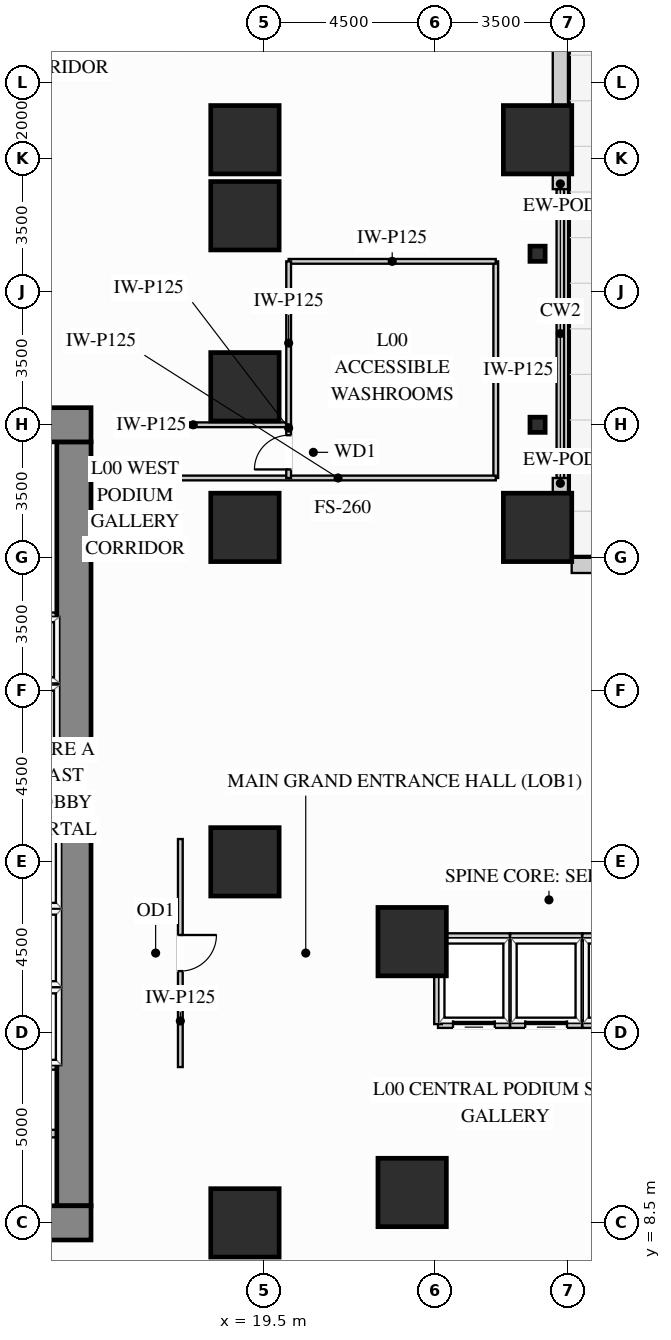
"""IFC4 building model, lengths in metres.
Left out: names, types, materials, properties, quantities, classifications, styles, units other than length and angle.
Written with IfcOpenShell. Run it as: python <this file> out.ifc"""

import sys

from ifc_helpers import new_model, si_unit, direction, frame, frame_2d, origin, origin_2d, place, context, subcontext, project, spatial, rectangle, hollow_rectangle, extrude, source, transform, mapped, element, fill, save


model = new_model("IFC4")
c1 = context("Model", 3, precision=1e-05, world=origin(), true_north=direction((0.0, 1.0)))
c2 = subcontext(c1, "Body", "Model", "MODEL_VIEW")
j1 = project(units=[si_unit("LENGTHUNIT", "METRE"), si_unit("PLANEANGLEUNIT", "RADIAN")], contexts=[c1])
p1 = place(None, origin())
s1 = spatial("IfcSite", under=j1, at=p1, CompositionType="ELEMENT")
p2 = place(p1, origin())
s2 = spatial("IfcBuilding", under=s1, at=p2, CompositionType="ELEMENT")
p3 = place(p2, origin())
s3 = spatial("IfcBuildingStorey", under=s2, at=p3, CompositionType="ELEMENT", Elevation=0.0)
m1 = source(origin(), c2, "Body", "SweptSolid", [
    extrude(rectangle(XDim=1.8, YDim=1.8, at=origin_2d()), origin(), (0.0, 0.0, 1.0), 4.25),
])
for number, where, z_axis, x_axis in (
    (1, (26.7, 26.8, 0.0), (0.0, 0.0, 1.0), (1.0, 0.0, 0.0)),
    (2, (26.7, 37.0, 0.0), (0.0, 0.0, 1.0), (1.0, 0.0, 0.0)),
    (3, (19.0, 8.5, 0.0), (0.0, 0.0, 1.0), (1.0, 0.0, 0.0)),
    (4, (19.0, 18.0, 0.0), (0.0, 0.0, 1.0), (1.0, 0.0, 0.0)),
    (5, (19.0, 26.8, 0.0), (0.0, 0.0, 1.0), (1.0, 0.0, 0.0)),
    (6, (19.0, 30.5, 0.0), (0.0, 0.0, 1.0), (1.0, 0.0, 0.0)),
    (7, (19.0, 35.0, 0.0), (0.0, 0.0, 1.0), (1.0, 0.0, 0.0)),
    (8, (19.0, 37.0, 0.0), (0.0, 0.0, 1.0), (1.0, 0.0, 0.0)),
    (9, (23.4, 9.3, 0.0), (0.0, 0.0, 1.0), (1.0, 0.0, 0.0)),
    (10, (23.4, 15.9, 0.0), (0.0, 0.0, 1.0), (1.0, 0.0, 0.0)),
):
    element("IfcColumn", number, at=place(p3, frame(where, z_axis=z_axis, x_axis=x_axis)), inside=s3, PredefinedType="COLUMN", context=c2, shape_type="MappedRepresentation", body=[
        mapped(m1, transform((0.0, 0.0, 0.0), x_axis=(1.0, 0.0, 0.0), y_axis=(0.0, 1.0, 0.0), z_axis=(0.0, 0.0, 1.0))),
    ])
m2 = source(origin(), c2, "Body", "SweptSolid", [
    extrude(hollow_rectangle(XDim=0.4, YDim=0.4, WallThickness=0.02, at=origin_2d()), origin(), (0.0, 0.0, 1.0), 4.25),
])
for number, where, z_axis, x_axis in (
    (11, (26.7, 29.5, 0.0), (0.0, 0.0, 1.0), (1.0, 0.0, 0.0)),
    (12, (26.7, 34.0, 0.0), (0.0, 0.0, 1.0), (1.0, 0.0, 0.0)),
):
    element("IfcColumn", number, at=place(p3, frame(where, z_axis=z_axis, x_axis=x_axis)), inside=s3, PredefinedType="PILASTER", context=c2, shape_type="MappedRepresentation", body=[
        mapped(m2, transform((0.0, 0.0, 0.0), x_axis=(1.0, 0.0, 0.0), y_axis=(0.0, 1.0, 0.0), z_axis=(0.0, 0.0, 1.0))),
    ])
m3 = source(origin(), c2, "Body", "SweptSolid", [
    extrude(rectangle(XDim=9.87, YDim=0.9, at=frame_2d((4.935, 0.0))), origin(), (0.0, 0.0, 1.0), 4.25),
])
p4 = place(p3, frame((14.5, 8.95, 0.0), z_axis=(0.0, 0.0, 1.0), x_axis=(0.0, 1.0, 0.0)))
e13 = element("IfcWall", 13, at=p4, inside=s3, PredefinedType="SHEAR", context=c2, shape_type="MappedRepresentation", body=[
    mapped(m3, transform((0.0, 0.0, 0.0), x_axis=(1.0, 0.0, 0.0), y_axis=(0.0, 1.0, 0.0), z_axis=(0.0, 0.0, 1.0))),
])
m4 = source(origin(), c2, "Body", "SweptSolid", [
    extrude(rectangle(XDim=8.17, YDim=0.9, at=frame_2d((4.085, 0.0))), origin(), (0.0, 0.0, 1.0), 4.25),
])
p5 = place(p3, frame((14.5, 20.88, 0.0), z_axis=(0.0, 0.0, 1.0), x_axis=(0.0, 1.0, 0.0)))
e14 = element("IfcWall", 14, at=p5, inside=s3, PredefinedType="SHEAR", context=c2, shape_type="MappedRepresentation", body=[
    mapped(m4, transform((0.0, 0.0, 0.0), x_axis=(1.0, 0.0, 0.0), y_axis=(0.0, 1.0, 0.0), z_axis=(0.0, 0.0, 1.0))),
])
m5 = source(origin(), c2, "Body", "SweptSolid", [
    extrude(rectangle(XDim=10.9, YDim=0.9, at=frame_2d((5.45, 0.0))), origin(), (0.0, 0.0, 1.0), 4.25),
])
for number, where, z_axis, x_axis in (
    (15, (4.05, 29.5, 0.0), (0.0, 0.0, 1.0), (1.0, 0.0, 0.0)),
    (16, (4.05, 8.5, 0.0), (0.0, 0.0, 1.0), (1.0, 0.0, 0.0)),
):
    element("IfcWall", number, at=place(p3, frame(where, z_axis=z_axis, x_axis=x_axis)), inside=s3, PredefinedType="SHEAR", context=c2, shape_type="MappedRepresentation", body=[
        mapped(m5, transform((0.0, 0.0, 0.0), x_axis=(1.0, 0.0, 0.0), y_axis=(0.0, 1.0, 0.0), z_axis=(0.0, 0.0, 1.0))),
    ])
p6 = place(p3, frame((46.702, 25.8, 0.0), z_axis=(0.0, 0.0, 1.0), x_axis=(-1.0, 0.0, 0.0)))
e17 = element("IfcWall", 17, at=p6, inside=s3, PredefinedType="SOLIDWALL", context=c2, shape_type="SweptSolid", body=[
    extrude(rectangle(XDim=19.104, YDim=0.4, at=frame_2d((9.552, 0.0))), origin(), (0.0, 0.0, 1.0), 4.235),
])
p7 = place(p6, frame((8.202, 0.0, 0.65)))
e18 = element("IfcOpeningElement", 18, at=p7, cuts=e17, PredefinedType="OPENING", context=c2, shape_type="SweptSolid", body=[
    extrude(rectangle(XDim=2.7, YDim=2.6, at=frame_2d((1.35, 1.3))), frame((0.0, 0.21, 0.0), z_axis=(0.0, -1.0, 0.0), x_axis=(1.0, 0.0, 0.0)), (0.0, 0.0, 1.0), 0.42),
])
m6 = source(origin(), c2, "Body", "SweptSolid", [
    extrude(rectangle(XDim=0.402, YDim=0.4, at=frame_2d((0.201, 0.0))), origin(), (0.0, 0.0, 1.0), 4.235),
])
for number, where, z_axis, x_axis in (
    (19, (27.3, 27.698, 0.0), (0.0, 0.0, 1.0), (0.0, 1.0, 0.0)),
    (20, (27.3, 35.7, 0.0), (0.0, 0.0, 1.0), (0.0, 1.0, 0.0)),
):
    element("IfcWall", number, at=place(p3, frame(where, z_axis=z_axis, x_axis=x_axis)), inside=s3, PredefinedType="SOLIDWALL", context=c2, shape_type="MappedRepresentation", body=[
        mapped(m6, transform((0.0, 0.0, 0.0), x_axis=(1.0, 0.0, 0.0), y_axis=(0.0, 1.0, 0.0), z_axis=(0.0, 0.0, 1.0))),
    ])
p8 = place(p3, frame((27.3, 37.898, 0.0), z_axis=(0.0, 0.0, 1.0), x_axis=(0.0, 1.0, 0.0)))
e21 = element("IfcWall", 21, at=p8, inside=s3, PredefinedType="SOLIDWALL", context=c2, shape_type="SweptSolid", body=[
    extrude(rectangle(XDim=10.604, YDim=0.4, at=frame_2d((5.302, 0.0))), origin(), (0.0, 0.0, 1.0), 4.235),
])
p9 = place(p8, frame((1.652, 0.0, 0.0)))
e22 = element("IfcOpeningElement", 22, at=p9, cuts=e21, PredefinedType="OPENING", context=c2, shape_type="SweptSolid", body=[
    extrude(rectangle(XDim=2.4, YDim=2.6, at=frame_2d((1.2, 1.3))), frame((0.0, 0.21, 0.0), z_axis=(0.0, -1.0, 0.0), x_axis=(1.0, 0.0, 0.0)), (0.0, 0.0, 1.0), 0.42),
])
p10 = place(p8, frame((6.502, 0.0, 0.0)))
e23 = element("IfcOpeningElement", 23, at=p10, cuts=e21, PredefinedType="OPENING", context=c2, shape_type="SweptSolid", body=[
    extrude(rectangle(XDim=3.8, YDim=2.65, at=frame_2d((1.9, 1.325))), frame((0.0, 0.21, 0.0), z_axis=(0.0, -1.0, 0.0), x_axis=(1.0, 0.0, 0.0)), (0.0, 0.0, 1.0), 0.42),
])
m7 = source(origin(), c2, "Body", "SweptSolid", [
    extrude(rectangle(XDim=5.7, YDim=0.125, at=frame_2d((2.85, 0.0))), origin(), (0.0, 0.0, 1.0), 4.235),
])
p11 = place(p3, frame((25.6, 28.1, 0.0), z_axis=(0.0, 0.0, 1.0), x_axis=(0.0, 1.0, 0.0)))
e24 = element("IfcWall", 24, at=p11, inside=s3, PredefinedType="PARTITIONING", context=c2, shape_type="MappedRepresentation", body=[
    mapped(m7, transform((0.0, 0.0, 0.0), x_axis=(1.0, 0.0, 0.0), y_axis=(0.0, 1.0, 0.0), z_axis=(0.0, 0.0, 1.0))),
])
m8 = source(origin(), c2, "Body", "SweptSolid", [
    extrude(rectangle(XDim=2.85, YDim=0.125, at=frame_2d((1.425, 0.0))), origin(), (0.0, 0.0, 1.0), 4.235),
])
p12 = place(p3, frame((17.3, 29.5, 0.0), z_axis=(0.0, 0.0, 1.0), x_axis=(1.0, 0.0, 0.0)))
e25 = element("IfcWall", 25, at=p12, inside=s3, PredefinedType="PARTITIONING", context=c2, shape_type="MappedRepresentation", body=[
    mapped(m8, transform((0.0, 0.0, 0.0), x_axis=(1.0, 0.0, 0.0), y_axis=(0.0, 1.0, 0.0), z_axis=(0.0, 0.0, 1.0))),
])
m9 = source(origin(), c2, "Body", "SweptSolid", [
    extrude(rectangle(XDim=5.45, YDim=0.125, at=frame_2d((2.725, 0.0))), origin(), (0.0, 0.0, 1.0), 4.235),
])
p13 = place(p3, frame((20.15, 33.8, 0.0), z_axis=(0.0, 0.0, 1.0), x_axis=(1.0, 0.0, 0.0)))
e26 = element("IfcWall", 26, at=p13, inside=s3, PredefinedType="PARTITIONING", context=c2, shape_type="MappedRepresentation", body=[
    mapped(m9, transform((0.0, 0.0, 0.0), x_axis=(1.0, 0.0, 0.0), y_axis=(0.0, 1.0, 0.0), z_axis=(0.0, 0.0, 1.0))),
])
m10 = source(origin(), c2, "Body", "SweptSolid", [
    extrude(rectangle(XDim=8.3, YDim=0.125, at=frame_2d((4.15, 0.0))), origin(), (0.0, 0.0, 1.0), 4.235),
])
p14 = place(p3, frame((17.3, 28.1, 0.0), z_axis=(0.0, 0.0, 1.0), x_axis=(1.0, 0.0, 0.0)))
e27 = element("IfcWall", 27, at=p14, inside=s3, PredefinedType="PARTITIONING", context=c2, shape_type="MappedRepresentation", body=[
    mapped(m10, transform((0.0, 0.0, 0.0), x_axis=(1.0, 0.0, 0.0), y_axis=(0.0, 1.0, 0.0), z_axis=(0.0, 0.0, 1.0))),
])
m11 = source(origin(), c2, "Body", "SweptSolid", [
    extrude(rectangle(XDim=4.3, YDim=0.125, at=frame_2d((2.15, 0.0))), origin(), (0.0, 0.0, 1.0), 4.235),
])
p15 = place(p3, frame((20.15, 29.5, 0.0), z_axis=(0.0, 0.0, 1.0), x_axis=(0.0, 1.0, 0.0)))
e28 = element("IfcWall", 28, at=p15, inside=s3, PredefinedType="PARTITIONING", context=c2, shape_type="MappedRepresentation", body=[
    mapped(m11, transform((0.0, 0.0, 0.0), x_axis=(1.0, 0.0, 0.0), y_axis=(0.0, 1.0, 0.0), z_axis=(0.0, 0.0, 1.0))),
])
p16 = place(p3, frame((20.15, 28.1, 0.0), z_axis=(0.0, 0.0, 1.0), x_axis=(0.0, 1.0, 0.0)))
e29 = element("IfcWall", 29, at=p16, inside=s3, PredefinedType="PARTITIONING", context=c2, shape_type="SweptSolid", body=[
    extrude(rectangle(XDim=1.4, YDim=0.125, at=frame_2d((0.7, 0.0))), origin(), (0.0, 0.0, 1.0), 4.235),
])
p17 = place(p16, frame((0.225, 0.0, 0.0)))
e30 = element("IfcOpeningElement", 30, at=p17, cuts=e29, PredefinedType="OPENING", context=c2, shape_type="SweptSolid", body=[
    extrude(rectangle(XDim=0.9, YDim=2.15, at=frame_2d((0.45, 1.075))), frame((0.0, 0.073, 0.0), z_axis=(0.0, -1.0, 0.0), x_axis=(1.0, 0.0, 0.0)), (0.0, 0.0, 1.0), 0.145),
])
p18 = place(p3, frame((17.3, 12.6, 0.0), z_axis=(0.0, 0.0, 1.0), x_axis=(0.0, 1.0, 0.0)))
e31 = element("IfcWall", 31, at=p18, inside=s3, PredefinedType="PARTITIONING", context=c2, shape_type="SweptSolid", body=[
    extrude(rectangle(XDim=6.0, YDim=0.125, at=frame_2d((3.0, 0.0))), origin(), (0.0, 0.0, 1.0), 4.235),
])
p19 = place(p18, frame((2.525, 0.0, 0.0)))
e32 = element("IfcOpeningElement", 32, at=p19, cuts=e31, PredefinedType="OPENING", context=c2, shape_type="SweptSolid", body=[
    extrude(rectangle(XDim=0.95, YDim=2.15, at=frame_2d((0.475, 1.075))), frame((0.0, 0.073, 0.0), z_axis=(0.0, -1.0, 0.0), x_axis=(1.0, 0.0, 0.0)), (0.0, 0.0, 1.0), 0.145),
])
m12 = source(origin(), c2, "Body", "SweptSolid", [
    extrude(rectangle(XDim=1.6, YDim=0.2, at=frame_2d((0.8, 0.0))), origin(), (0.0, 0.0, 1.0), 4.235),
])
p20 = place(p3, frame((12.42, 10.85, 0.0), z_axis=(0.0, 0.0, 1.0), x_axis=(1.0, 0.0, 0.0)))
e33 = element("IfcWall", 33, at=p20, inside=s3, PredefinedType="PARTITIONING", context=c2, shape_type="MappedRepresentation", body=[
    mapped(m12, transform((0.0, 0.0, 0.0), x_axis=(1.0, 0.0, 0.0), y_axis=(0.0, 1.0, 0.0), z_axis=(0.0, 0.0, 1.0))),
])
m13 = source(origin(), c2, "Body", "SweptSolid", [
    extrude(rectangle(XDim=2.19, YDim=0.2, at=frame_2d((1.095, 0.0))), origin(), (0.0, 0.0, 1.0), 4.235),
])
for number, where, z_axis, x_axis in (
    (34, (11.83, 22.66, 0.0), (0.0, 0.0, 1.0), (1.0, 0.0, 0.0)),
    (35, (11.83, 20.9, 0.0), (0.0, 0.0, 1.0), (1.0, 0.0, 0.0)),
    (36, (11.83, 24.46, 0.0), (0.0, 0.0, 1.0), (1.0, 0.0, 0.0)),
):
    element("IfcWall", number, at=place(p3, frame(where, z_axis=z_axis, x_axis=x_axis)), inside=s3, PredefinedType="PARTITIONING", context=c2, shape_type="MappedRepresentation", body=[
        mapped(m13, transform((0.0, 0.0, 0.0), x_axis=(1.0, 0.0, 0.0), y_axis=(0.0, 1.0, 0.0), z_axis=(0.0, 0.0, 1.0))),
    ])
m14 = source(origin(), c2, "Body", "SweptSolid", [
    extrude(rectangle(XDim=1.79, YDim=0.2, at=frame_2d((0.895, 0.0))), origin(), (0.0, 0.0, 1.0), 4.235),
])
for number, where, z_axis, x_axis in (
    (37, (12.23, 14.7, 0.0), (0.0, 0.0, 1.0), (1.0, 0.0, 0.0)),
    (38, (12.23, 12.63, 0.0), (0.0, 0.0, 1.0), (1.0, 0.0, 0.0)),
    (39, (12.23, 16.77, 0.0), (0.0, 0.0, 1.0), (1.0, 0.0, 0.0)),
    (40, (12.23, 18.82, 0.0), (0.0, 0.0, 1.0), (1.0, 0.0, 0.0)),
):
    element("IfcWall", number, at=place(p3, frame(where, z_axis=z_axis, x_axis=x_axis)), inside=s3, PredefinedType="PARTITIONING", context=c2, shape_type="MappedRepresentation", body=[
        mapped(m14, transform((0.0, 0.0, 0.0), x_axis=(1.0, 0.0, 0.0), y_axis=(0.0, 1.0, 0.0), z_axis=(0.0, 0.0, 1.0))),
    ])
m15 = source(origin(), c2, "Body", "SweptSolid", [
    extrude(rectangle(XDim=2.29, YDim=0.2, at=frame_2d((1.145, 0.0))), origin(), (0.0, 0.0, 1.0), 4.235),
])
p21 = place(p3, frame((25.97, 13.73, 0.0), z_axis=(0.0, 0.0, 1.0), x_axis=(0.0, 1.0, 0.0)))
e41 = element("IfcWall", 41, at=p21, inside=s3, PredefinedType="PARTITIONING", context=c2, shape_type="MappedRepresentation", body=[
    mapped(m15, transform((0.0, 0.0, 0.0), x_axis=(1.0, 0.0, 0.0), y_axis=(0.0, 1.0, 0.0), z_axis=(0.0, 0.0, 1.0))),
])
m16 = source(origin(), c2, "Body", "SweptSolid", [
    extrude(rectangle(XDim=1.89, YDim=0.2, at=frame_2d((0.945, 0.0))), origin(), (0.0, 0.0, 1.0), 4.235),
])
p22 = place(p3, frame((24.08, 16.02, 0.0), z_axis=(0.0, 0.0, 1.0), x_axis=(1.0, 0.0, 0.0)))
e42 = element("IfcWall", 42, at=p22, inside=s3, PredefinedType="PARTITIONING", context=c2, shape_type="MappedRepresentation", body=[
    mapped(m16, transform((0.0, 0.0, 0.0), x_axis=(1.0, 0.0, 0.0), y_axis=(0.0, 1.0, 0.0), z_axis=(0.0, 0.0, 1.0))),
])
p23 = place(p3, frame((24.08, 13.73, 0.0), z_axis=(0.0, 0.0, 1.0), x_axis=(1.0, 0.0, 0.0)))
e43 = element("IfcWall", 43, at=p23, inside=s3, PredefinedType="PARTITIONING", context=c2, shape_type="SweptSolid", body=[
    extrude(rectangle(XDim=1.89, YDim=0.2, at=frame_2d((0.945, 0.0))), origin(), (0.0, 0.0, 1.0), 4.235),
])
p24 = place(p23, frame((0.395, 0.0, 0.0)))
e44 = element("IfcOpeningElement", 44, at=p24, cuts=e43, PredefinedType="OPENING", context=c2, shape_type="SweptSolid", body=[
    extrude(rectangle(XDim=1.1, YDim=2.2, at=frame_2d((0.55, 1.1))), frame((0.0, 0.11, 0.0), z_axis=(0.0, -1.0, 0.0), x_axis=(1.0, 0.0, 0.0)), (0.0, 0.0, 1.0), 0.22),
])
for number, where, z_axis, x_axis in (
    (45, (24.08, 13.73, 0.0), (0.0, 0.0, 1.0), (0.0, 1.0, 0.0)),
    (46, (27.87, 13.73, 0.0), (0.0, 0.0, 1.0), (0.0, 1.0, 0.0)),
):
    element("IfcWall", number, at=place(p3, frame(where, z_axis=z_axis, x_axis=x_axis)), inside=s3, PredefinedType="PARTITIONING", context=c2, shape_type="MappedRepresentation", body=[
        mapped(m15, transform((0.0, 0.0, 0.0), x_axis=(1.0, 0.0, 0.0), y_axis=(0.0, 1.0, 0.0), z_axis=(0.0, 0.0, 1.0))),
    ])
m17 = source(origin(), c2, "Body", "SweptSolid", [
    extrude(rectangle(XDim=1.89, YDim=0.2, at=frame_2d((0.945, 0.0))), origin(), (0.0, 0.0, 1.0), 4.235),
])
p25 = place(p3, frame((25.98, 16.02, 0.0), z_axis=(0.0, 0.0, 1.0), x_axis=(1.0, 0.0, 0.0)))
e47 = element("IfcWall", 47, at=p25, inside=s3, PredefinedType="PARTITIONING", context=c2, shape_type="MappedRepresentation", body=[
    mapped(m17, transform((0.0, 0.0, 0.0), x_axis=(1.0, 0.0, 0.0), y_axis=(0.0, 1.0, 0.0), z_axis=(0.0, 0.0, 1.0))),
])
p26 = place(p3, frame((25.98, 13.73, 0.0), z_axis=(0.0, 0.0, 1.0), x_axis=(1.0, 0.0, 0.0)))
e48 = element("IfcWall", 48, at=p26, inside=s3, PredefinedType="PARTITIONING", context=c2, shape_type="SweptSolid", body=[
    extrude(rectangle(XDim=1.89, YDim=0.2, at=frame_2d((0.945, 0.0))), origin(), (0.0, 0.0, 1.0), 4.235),
])
p27 = place(p26, frame((0.395, 0.0, 0.0)))
e49 = element("IfcOpeningElement", 49, at=p27, cuts=e48, PredefinedType="OPENING", context=c2, shape_type="SweptSolid", body=[
    extrude(rectangle(XDim=1.1, YDim=2.2, at=frame_2d((0.55, 1.1))), frame((0.0, 0.11, 0.0), z_axis=(0.0, -1.0, 0.0), x_axis=(1.0, 0.0, 0.0)), (0.0, 0.0, 1.0), 0.22),
])
p28 = place(p3, frame((27.88, 16.02, 0.0), z_axis=(0.0, 0.0, 1.0), x_axis=(1.0, 0.0, 0.0)))
e50 = element("IfcWall", 50, at=p28, inside=s3, PredefinedType="PARTITIONING", context=c2, shape_type="MappedRepresentation", body=[
    mapped(m17, transform((0.0, 0.0, 0.0), x_axis=(1.0, 0.0, 0.0), y_axis=(0.0, 1.0, 0.0), z_axis=(0.0, 0.0, 1.0))),
])
p29 = place(p3, frame((27.88, 13.73, 0.0), z_axis=(0.0, 0.0, 1.0), x_axis=(1.0, 0.0, 0.0)))
e51 = element("IfcWall", 51, at=p29, inside=s3, PredefinedType="PARTITIONING", context=c2, shape_type="SweptSolid", body=[
    extrude(rectangle(XDim=1.89, YDim=0.2, at=frame_2d((0.945, 0.0))), origin(), (0.0, 0.0, 1.0), 4.235),
])
p30 = place(p29, frame((0.395, 0.0, 0.0)))
e52 = element("IfcOpeningElement", 52, at=p30, cuts=e51, PredefinedType="OPENING", context=c2, shape_type="SweptSolid", body=[
    extrude(rectangle(XDim=1.1, YDim=2.2, at=frame_2d((0.55, 1.1))), frame((0.0, 0.11, 0.0), z_axis=(0.0, -1.0, 0.0), x_axis=(1.0, 0.0, 0.0)), (0.0, 0.0, 1.0), 0.22),
])
m18 = source(origin(), c2, "Body", "SweptSolid", [
    extrude(rectangle(XDim=1.1, YDim=2.2, at=frame_2d((0.55, 1.1))), frame((0.0, 0.025, 0.0), z_axis=(0.0, -1.0, 0.0), x_axis=(1.0, 0.0, 0.0)), (0.0, 0.0, 1.0), 0.05),
])
p31 = place(p24, origin())
e53 = element("IfcDoor", 53, at=p31, inside=s3, OperationType="SLIDING_TO_LEFT", PredefinedType="DOOR", context=c2, shape_type="MappedRepresentation", body=[
    mapped(m18, transform((0.0, 0.0, 0.0), x_axis=(1.0, 0.0, 0.0), y_axis=(0.0, 1.0, 0.0), z_axis=(0.0, 0.0, 1.0))),
])
fill(e44, e53)
p32 = place(p27, origin())
e54 = element("IfcDoor", 54, at=p32, inside=s3, OperationType="SLIDING_TO_LEFT", PredefinedType="DOOR", context=c2, shape_type="MappedRepresentation", body=[
    mapped(m18, transform((0.0, 0.0, 0.0), x_axis=(1.0, 0.0, 0.0), y_axis=(0.0, 1.0, 0.0), z_axis=(0.0, 0.0, 1.0))),
])
fill(e49, e54)
m19 = source(origin(), c2, "Body", "SweptSolid", [
    extrude(rectangle(XDim=0.95, YDim=2.15, at=frame_2d((0.475, 1.075))), frame((0.0, 0.025, 0.0), z_axis=(0.0, -1.0, 0.0), x_axis=(1.0, 0.0, 0.0)), (0.0, 0.0, 1.0), 0.05),
])
p33 = place(p19, origin())
e55 = element("IfcDoor", 55, at=p33, inside=s3, OperationType="SINGLE_SWING_RIGHT", PredefinedType="DOOR", context=c2, shape_type="MappedRepresentation", body=[
    mapped(m19, transform((0.0, 0.0, 0.0), x_axis=(1.0, 0.0, 0.0), y_axis=(0.0, 1.0, 0.0), z_axis=(0.0, 0.0, 1.0))),
])
fill(e32, e55)
m20 = source(origin(), c2, "Body", "SweptSolid", [
    extrude(rectangle(XDim=0.9, YDim=2.15, at=frame_2d((0.45, 1.075))), frame((0.0, 0.025, 0.0), z_axis=(0.0, -1.0, 0.0), x_axis=(1.0, 0.0, 0.0)), (0.0, 0.0, 1.0), 0.05),
])
p34 = place(p17, origin())
e56 = element("IfcDoor", 56, at=p34, inside=s3, OperationType="SINGLE_SWING_LEFT", PredefinedType="DOOR", context=c2, shape_type="MappedRepresentation", body=[
    mapped(m20, transform((0.0, 0.0, 0.0), x_axis=(1.0, 0.0, 0.0), y_axis=(0.0, 1.0, 0.0), z_axis=(0.0, 0.0, 1.0))),
])
fill(e30, e56)
save(model, sys.argv[1])
